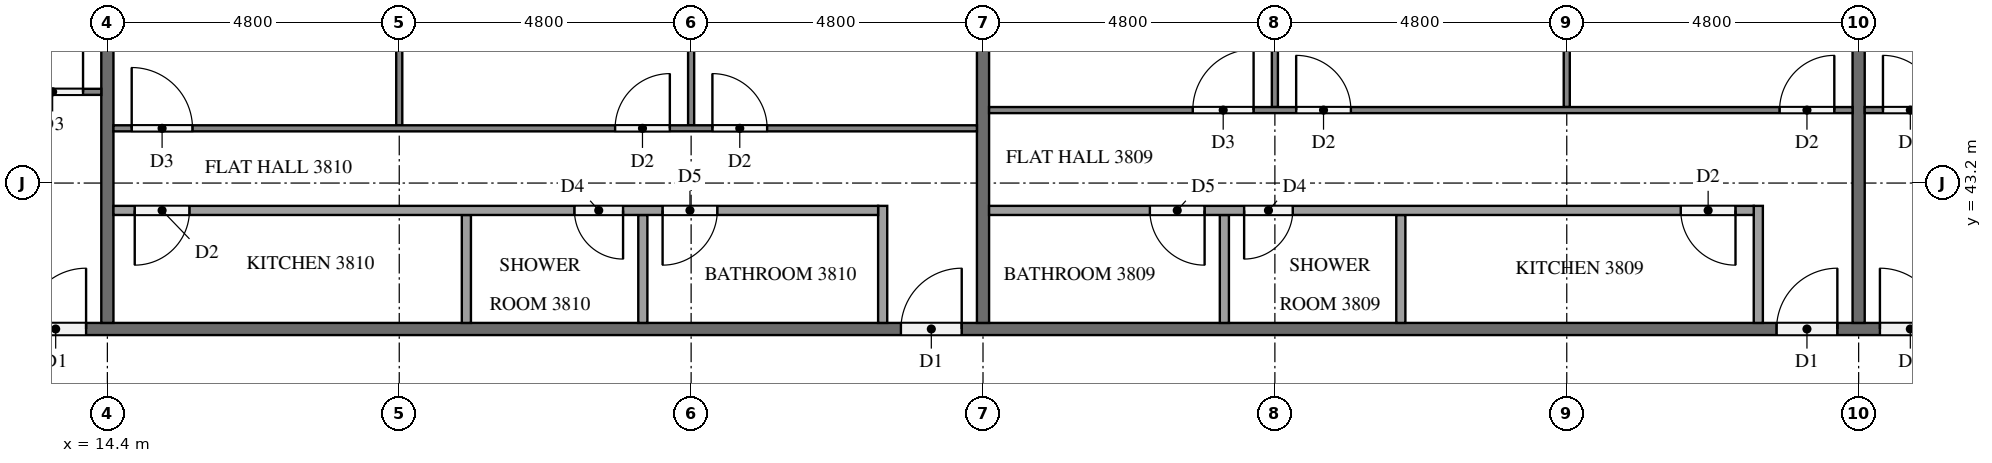
"""IFC4 building model, lengths in metres.
Left out: names, types, materials, properties, quantities, classifications, styles, units other than length and angle.
Written with IfcOpenShell. Run it as: python <this file> out.ifc"""

import sys

from ifc_helpers import new_model, si_unit, direction, frame, frame_2d, origin, place, context, subcontext, project, spatial, rectangle, extrude, element, fill, save


model = new_model("IFC4")
c1 = context("Model", 3, precision=1e-05, world=origin(), true_north=direction((0.0, 1.0)))
c2 = subcontext(c1, "Body", "Model", "MODEL_VIEW")
j1 = project(units=[si_unit("LENGTHUNIT", "METRE"), si_unit("PLANEANGLEUNIT", "RADIAN")], contexts=[c1])
p1 = place(None, origin())
s1 = spatial("IfcSite", under=j1, at=p1, CompositionType="ELEMENT")
p2 = place(p1, origin())
s2 = spatial("IfcBuilding", under=s1, at=p2, CompositionType="ELEMENT")
p3 = place(p2, frame((0.0, 0.0, 149.0)))
s3 = spatial("IfcBuildingStorey", under=s2, at=p3, CompositionType="ELEMENT", Elevation=149.0)
p4 = place(p3, frame((11.9, 40.8, 0.0), z_axis=(0.0, 0.0, 1.0), x_axis=(1.0, 0.0, 0.0)))
e1 = element("IfcWall", 1, at=p4, inside=s3, PredefinedType="PARTITIONING", context=c2, shape_type="SweptSolid", body=[
    extrude(rectangle(XDim=38.6, YDim=0.2, at=frame_2d((19.3, 0.0))), origin(), (0.0, 0.0, 1.0), 3.2),
])
p5 = place(p4, frame((31.65, 0.0, 0.0)))
e2 = element("IfcOpeningElement", 2, at=p5, cuts=e1, PredefinedType="OPENING", context=c2, shape_type="SweptSolid", body=[
    extrude(rectangle(XDim=1.0, YDim=2.1, at=frame_2d((0.5, 1.05))), frame((0.0, 0.11, 0.0), z_axis=(0.0, -1.0, 0.0), x_axis=(1.0, 0.0, 0.0)), (0.0, 0.0, 1.0), 0.22),
])
p6 = place(p4, frame((29.95, 0.0, 0.0)))
e3 = element("IfcOpeningElement", 3, at=p6, cuts=e1, PredefinedType="OPENING", context=c2, shape_type="SweptSolid", body=[
    extrude(rectangle(XDim=1.0, YDim=2.1, at=frame_2d((0.5, 1.05))), frame((0.0, 0.11, 0.0), z_axis=(0.0, -1.0, 0.0), x_axis=(1.0, 0.0, 0.0)), (0.0, 0.0, 1.0), 0.22),
])
p7 = place(p4, frame((15.55, 0.0, 0.0)))
e4 = element("IfcOpeningElement", 4, at=p7, cuts=e1, PredefinedType="OPENING", context=c2, shape_type="SweptSolid", body=[
    extrude(rectangle(XDim=1.0, YDim=2.1, at=frame_2d((0.5, 1.05))), frame((0.0, 0.11, 0.0), z_axis=(0.0, -1.0, 0.0), x_axis=(1.0, 0.0, 0.0)), (0.0, 0.0, 1.0), 0.22),
])
p8 = place(p4, frame((1.15, 0.0, 0.0)))
e5 = element("IfcOpeningElement", 5, at=p8, cuts=e1, PredefinedType="OPENING", context=c2, shape_type="SweptSolid", body=[
    extrude(rectangle(XDim=1.0, YDim=2.1, at=frame_2d((0.5, 1.05))), frame((0.0, 0.11, 0.0), z_axis=(0.0, -1.0, 0.0), x_axis=(1.0, 0.0, 0.0)), (0.0, 0.0, 1.0), 0.22),
])
p9 = place(p3, frame((43.2, 47.625, 0.0), z_axis=(0.0, 0.0, 1.0), x_axis=(0.0, -1.0, 0.0)))
e6 = element("IfcWall", 6, at=p9, inside=s3, PredefinedType="PARTITIONING", context=c2, shape_type="SweptSolid", body=[
    extrude(rectangle(XDim=6.725, YDim=0.2, at=frame_2d((3.363, 0.0))), origin(), (0.0, 0.0, 1.0), 3.2),
])
p10 = place(p3, frame((28.8, 47.9, 0.0), z_axis=(0.0, 0.0, 1.0), x_axis=(0.0, -1.0, 0.0)))
e7 = element("IfcWall", 7, at=p10, inside=s3, PredefinedType="PARTITIONING", context=c2, shape_type="SweptSolid", body=[
    extrude(rectangle(XDim=7.0, YDim=0.2, at=frame_2d((3.5, 0.0))), origin(), (0.0, 0.0, 1.0), 3.2),
])
p11 = place(p3, frame((14.4, 47.625, 0.0), z_axis=(0.0, 0.0, 1.0), x_axis=(0.0, -1.0, 0.0)))
e8 = element("IfcWall", 8, at=p11, inside=s3, PredefinedType="PARTITIONING", context=c2, shape_type="SweptSolid", body=[
    extrude(rectangle(XDim=6.725, YDim=0.2, at=frame_2d((3.363, 0.0))), origin(), (0.0, 0.0, 1.0), 3.2),
])
p12 = place(p3, frame((43.3, 44.4, 0.0), z_axis=(0.0, 0.0, 1.0), x_axis=(1.0, 0.0, 0.0)))
e9 = element("IfcWall", 9, at=p12, inside=s3, PredefinedType="PARTITIONING", context=c2, shape_type="SweptSolid", body=[
    extrude(rectangle(XDim=13.878, YDim=0.1, at=frame_2d((6.939, 0.0))), origin(), (0.0, 0.0, 1.0), 3.2),
])
p13 = place(p12, frame((0.3, 0.0, 0.0)))
e10 = element("IfcOpeningElement", 10, at=p13, cuts=e9, PredefinedType="OPENING", context=c2, shape_type="SweptSolid", body=[
    extrude(rectangle(XDim=0.9, YDim=2.1, at=frame_2d((0.45, 1.05))), frame((0.0, 0.06, 0.0), z_axis=(0.0, -1.0, 0.0), x_axis=(1.0, 0.0, 0.0)), (0.0, 0.0, 1.0), 0.12),
])
p14 = place(p12, frame((8.15, 0.0, 0.0)))
e11 = element("IfcOpeningElement", 11, at=p14, cuts=e9, PredefinedType="OPENING", context=c2, shape_type="SweptSolid", body=[
    extrude(rectangle(XDim=1.0, YDim=2.1, at=frame_2d((0.5, 1.05))), frame((0.0, 0.06, 0.0), z_axis=(0.0, -1.0, 0.0), x_axis=(1.0, 0.0, 0.0)), (0.0, 0.0, 1.0), 0.12),
])
p15 = place(p12, frame((9.85, 0.0, 0.0)))
e12 = element("IfcOpeningElement", 12, at=p15, cuts=e9, PredefinedType="OPENING", context=c2, shape_type="SweptSolid", body=[
    extrude(rectangle(XDim=0.9, YDim=2.1, at=frame_2d((0.45, 1.05))), frame((0.0, 0.06, 0.0), z_axis=(0.0, -1.0, 0.0), x_axis=(1.0, 0.0, 0.0)), (0.0, 0.0, 1.0), 0.12),
])
p16 = place(p3, frame((38.4, 44.45, 0.0), z_axis=(0.0, 0.0, 1.0), x_axis=(0.0, 1.0, 0.0)))
e13 = element("IfcWall", 13, at=p16, inside=s3, PredefinedType="PARTITIONING", context=c2, shape_type="SweptSolid", body=[
    extrude(rectangle(XDim=3.45, YDim=0.1, at=frame_2d((1.725, 0.0))), origin(), (0.0, 0.0, 1.0), 3.2),
])
p17 = place(p3, frame((33.6, 44.45, 0.0), z_axis=(0.0, 0.0, 1.0), x_axis=(0.0, 1.0, 0.0)))
e14 = element("IfcWall", 14, at=p17, inside=s3, PredefinedType="PARTITIONING", context=c2, shape_type="SweptSolid", body=[
    extrude(rectangle(XDim=3.175, YDim=0.1, at=frame_2d((1.587, 0.0))), origin(), (0.0, 0.0, 1.0), 3.2),
])
p18 = place(p3, frame((28.9, 44.4, 0.0), z_axis=(0.0, 0.0, 1.0), x_axis=(1.0, 0.0, 0.0)))
e15 = element("IfcWall", 15, at=p18, inside=s3, PredefinedType="PARTITIONING", context=c2, shape_type="SweptSolid", body=[
    extrude(rectangle(XDim=14.2, YDim=0.1, at=frame_2d((7.1, 0.0))), origin(), (0.0, 0.0, 1.0), 3.2),
])
p19 = place(p18, frame((13.0, 0.0, 0.0)))
e16 = element("IfcOpeningElement", 16, at=p19, cuts=e15, PredefinedType="OPENING", context=c2, shape_type="SweptSolid", body=[
    extrude(rectangle(XDim=0.9, YDim=2.1, at=frame_2d((0.45, 1.05))), frame((0.0, 0.06, 0.0), z_axis=(0.0, -1.0, 0.0), x_axis=(1.0, 0.0, 0.0)), (0.0, 0.0, 1.0), 0.12),
])
p20 = place(p18, frame((5.05, 0.0, 0.0)))
e17 = element("IfcOpeningElement", 17, at=p20, cuts=e15, PredefinedType="OPENING", context=c2, shape_type="SweptSolid", body=[
    extrude(rectangle(XDim=0.9, YDim=2.1, at=frame_2d((0.45, 1.05))), frame((0.0, 0.06, 0.0), z_axis=(0.0, -1.0, 0.0), x_axis=(1.0, 0.0, 0.0)), (0.0, 0.0, 1.0), 0.12),
])
p21 = place(p18, frame((3.35, 0.0, 0.0)))
e18 = element("IfcOpeningElement", 18, at=p21, cuts=e15, PredefinedType="OPENING", context=c2, shape_type="SweptSolid", body=[
    extrude(rectangle(XDim=1.0, YDim=2.1, at=frame_2d((0.5, 1.05))), frame((0.0, 0.06, 0.0), z_axis=(0.0, -1.0, 0.0), x_axis=(1.0, 0.0, 0.0)), (0.0, 0.0, 1.0), 0.12),
])
for number, where, z_axis, x_axis in (
    (19, (35.671, 40.9, 0.0), (0.0, 0.0, 1.0), (0.0, 1.0, 0.0)),
    (20, (32.769, 40.9, 0.0), (0.0, 0.0, 1.0), (0.0, 1.0, 0.0)),
):
    element("IfcWall", number, at=place(p3, frame(where, z_axis=z_axis, x_axis=x_axis)), inside=s3, PredefinedType="PARTITIONING", context=c2, shape_type="SweptSolid", body=[
        extrude(rectangle(XDim=1.775, YDim=0.15, at=frame_2d((0.888, 0.0))), origin(), (0.0, 0.0, 1.0), 3.2),
    ])
p22 = place(p3, frame((41.55, 40.9, 0.0), z_axis=(0.0, 0.0, 1.0), x_axis=(0.0, 1.0, 0.0)))
e21 = element("IfcWall", 21, at=p22, inside=s3, PredefinedType="PARTITIONING", context=c2, shape_type="SweptSolid", body=[
    extrude(rectangle(XDim=1.925, YDim=0.15, at=frame_2d((0.962, 0.0))), origin(), (0.0, 0.0, 1.0), 3.2),
])
p23 = place(p3, frame((41.475, 42.75, 0.0), z_axis=(0.0, 0.0, 1.0), x_axis=(-1.0, 0.0, 0.0)))
e22 = element("IfcWall", 22, at=p23, inside=s3, PredefinedType="PARTITIONING", context=c2, shape_type="SweptSolid", body=[
    extrude(rectangle(XDim=12.575, YDim=0.15, at=frame_2d((6.288, 0.0))), origin(), (0.0, 0.0, 1.0), 3.2),
])
p24 = place(p23, frame((0.3, 0.0, 0.0)))
e23 = element("IfcOpeningElement", 23, at=p24, cuts=e22, PredefinedType="OPENING", context=c2, shape_type="SweptSolid", body=[
    extrude(rectangle(XDim=0.9, YDim=2.1, at=frame_2d((0.45, 1.05))), frame((0.0, 0.085, 0.0), z_axis=(0.0, -1.0, 0.0), x_axis=(1.0, 0.0, 0.0)), (0.0, 0.0, 1.0), 0.17),
])
p25 = place(p23, frame((7.581, 0.0, 0.0)))
e24 = element("IfcOpeningElement", 24, at=p25, cuts=e22, PredefinedType="OPENING", context=c2, shape_type="SweptSolid", body=[
    extrude(rectangle(XDim=0.8, YDim=2.1, at=frame_2d((0.4, 1.05))), frame((0.0, 0.085, 0.0), z_axis=(0.0, -1.0, 0.0), x_axis=(1.0, 0.0, 0.0)), (0.0, 0.0, 1.0), 0.17),
])
p26 = place(p23, frame((9.031, 0.0, 0.0)))
e25 = element("IfcOpeningElement", 25, at=p26, cuts=e22, PredefinedType="OPENING", context=c2, shape_type="SweptSolid", body=[
    extrude(rectangle(XDim=0.9, YDim=2.1, at=frame_2d((0.45, 1.05))), frame((0.0, 0.085, 0.0), z_axis=(0.0, -1.0, 0.0), x_axis=(1.0, 0.0, 0.0)), (0.0, 0.0, 1.0), 0.17),
])
p27 = place(p3, frame((24.0, 44.15, 0.0), z_axis=(0.0, 0.0, 1.0), x_axis=(0.0, 1.0, 0.0)))
e26 = element("IfcWall", 26, at=p27, inside=s3, PredefinedType="PARTITIONING", context=c2, shape_type="SweptSolid", body=[
    extrude(rectangle(XDim=3.475, YDim=0.1, at=frame_2d((1.738, 0.0))), origin(), (0.0, 0.0, 1.0), 3.2),
])
p28 = place(p3, frame((19.2, 44.15, 0.0), z_axis=(0.0, 0.0, 1.0), x_axis=(0.0, 1.0, 0.0)))
e27 = element("IfcWall", 27, at=p28, inside=s3, PredefinedType="PARTITIONING", context=c2, shape_type="SweptSolid", body=[
    extrude(rectangle(XDim=3.75, YDim=0.1, at=frame_2d((1.875, 0.0))), origin(), (0.0, 0.0, 1.0), 3.2),
])
p29 = place(p3, frame((14.5, 44.1, 0.0), z_axis=(0.0, 0.0, 1.0), x_axis=(1.0, 0.0, 0.0)))
e28 = element("IfcWall", 28, at=p29, inside=s3, PredefinedType="PARTITIONING", context=c2, shape_type="SweptSolid", body=[
    extrude(rectangle(XDim=14.2, YDim=0.1, at=frame_2d((7.1, 0.0))), origin(), (0.0, 0.0, 1.0), 3.2),
])
p30 = place(p29, frame((9.85, 0.0, 0.0)))
e29 = element("IfcOpeningElement", 29, at=p30, cuts=e28, PredefinedType="OPENING", context=c2, shape_type="SweptSolid", body=[
    extrude(rectangle(XDim=0.9, YDim=2.1, at=frame_2d((0.45, 1.05))), frame((0.0, 0.06, 0.0), z_axis=(0.0, -1.0, 0.0), x_axis=(1.0, 0.0, 0.0)), (0.0, 0.0, 1.0), 0.12),
])
p31 = place(p29, frame((8.25, 0.0, 0.0)))
e30 = element("IfcOpeningElement", 30, at=p31, cuts=e28, PredefinedType="OPENING", context=c2, shape_type="SweptSolid", body=[
    extrude(rectangle(XDim=0.9, YDim=2.1, at=frame_2d((0.45, 1.05))), frame((0.0, 0.06, 0.0), z_axis=(0.0, -1.0, 0.0), x_axis=(1.0, 0.0, 0.0)), (0.0, 0.0, 1.0), 0.12),
])
p32 = place(p29, frame((0.3, 0.0, 0.0)))
e31 = element("IfcOpeningElement", 31, at=p32, cuts=e28, PredefinedType="OPENING", context=c2, shape_type="SweptSolid", body=[
    extrude(rectangle(XDim=1.0, YDim=2.1, at=frame_2d((0.5, 1.05))), frame((0.0, 0.06, 0.0), z_axis=(0.0, -1.0, 0.0), x_axis=(1.0, 0.0, 0.0)), (0.0, 0.0, 1.0), 0.12),
])
for number, where, z_axis, x_axis in (
    (32, (23.206, 40.9, 0.0), (0.0, 0.0, 1.0), (0.0, 1.0, 0.0)),
    (33, (20.304, 40.9, 0.0), (0.0, 0.0, 1.0), (0.0, 1.0, 0.0)),
):
    element("IfcWall", number, at=place(p3, frame(where, z_axis=z_axis, x_axis=x_axis)), inside=s3, PredefinedType="PARTITIONING", context=c2, shape_type="SweptSolid", body=[
        extrude(rectangle(XDim=1.775, YDim=0.15, at=frame_2d((0.888, 0.0))), origin(), (0.0, 0.0, 1.0), 3.2),
    ])
p33 = place(p3, frame((27.15, 40.9, 0.0), z_axis=(0.0, 0.0, 1.0), x_axis=(0.0, 1.0, 0.0)))
e34 = element("IfcWall", 34, at=p33, inside=s3, PredefinedType="PARTITIONING", context=c2, shape_type="SweptSolid", body=[
    extrude(rectangle(XDim=1.925, YDim=0.15, at=frame_2d((0.962, 0.0))), origin(), (0.0, 0.0, 1.0), 3.2),
])
p34 = place(p3, frame((27.075, 42.75, 0.0), z_axis=(0.0, 0.0, 1.0), x_axis=(-1.0, 0.0, 0.0)))
e35 = element("IfcWall", 35, at=p34, inside=s3, PredefinedType="PARTITIONING", context=c2, shape_type="SweptSolid", body=[
    extrude(rectangle(XDim=12.575, YDim=0.15, at=frame_2d((6.288, 0.0))), origin(), (0.0, 0.0, 1.0), 3.2),
])
p35 = place(p34, frame((2.644, 0.0, 0.0)))
e36 = element("IfcOpeningElement", 36, at=p35, cuts=e35, PredefinedType="OPENING", context=c2, shape_type="SweptSolid", body=[
    extrude(rectangle(XDim=0.9, YDim=2.1, at=frame_2d((0.45, 1.05))), frame((0.0, 0.085, 0.0), z_axis=(0.0, -1.0, 0.0), x_axis=(1.0, 0.0, 0.0)), (0.0, 0.0, 1.0), 0.17),
])
p36 = place(p34, frame((4.194, 0.0, 0.0)))
e37 = element("IfcOpeningElement", 37, at=p36, cuts=e35, PredefinedType="OPENING", context=c2, shape_type="SweptSolid", body=[
    extrude(rectangle(XDim=0.8, YDim=2.1, at=frame_2d((0.4, 1.05))), frame((0.0, 0.085, 0.0), z_axis=(0.0, -1.0, 0.0), x_axis=(1.0, 0.0, 0.0)), (0.0, 0.0, 1.0), 0.17),
])
p37 = place(p34, frame((11.325, 0.0, 0.0)))
e38 = element("IfcOpeningElement", 38, at=p37, cuts=e35, PredefinedType="OPENING", context=c2, shape_type="SweptSolid", body=[
    extrude(rectangle(XDim=0.9, YDim=2.1, at=frame_2d((0.45, 1.05))), frame((0.0, 0.085, 0.0), z_axis=(0.0, -1.0, 0.0), x_axis=(1.0, 0.0, 0.0)), (0.0, 0.0, 1.0), 0.17),
])
p38 = place(p3, frame((0.502, 44.7, 0.0), z_axis=(0.0, 0.0, 1.0), x_axis=(1.0, 0.0, 0.0)))
e39 = element("IfcWall", 39, at=p38, inside=s3, PredefinedType="PARTITIONING", context=c2, shape_type="SweptSolid", body=[
    extrude(rectangle(XDim=13.798, YDim=0.1, at=frame_2d((6.899, 0.0))), origin(), (0.0, 0.0, 1.0), 3.2),
])
p39 = place(p38, frame((12.498, 0.0, 0.0)))
e40 = element("IfcOpeningElement", 40, at=p39, cuts=e39, PredefinedType="OPENING", context=c2, shape_type="SweptSolid", body=[
    extrude(rectangle(XDim=1.0, YDim=2.1, at=frame_2d((0.5, 1.05))), frame((0.0, 0.06, 0.0), z_axis=(0.0, -1.0, 0.0), x_axis=(1.0, 0.0, 0.0)), (0.0, 0.0, 1.0), 0.12),
])
p40 = place(p38, frame((4.648, 0.0, 0.0)))
e41 = element("IfcOpeningElement", 41, at=p40, cuts=e39, PredefinedType="OPENING", context=c2, shape_type="SweptSolid", body=[
    extrude(rectangle(XDim=0.9, YDim=2.1, at=frame_2d((0.45, 1.05))), frame((0.0, 0.06, 0.0), z_axis=(0.0, -1.0, 0.0), x_axis=(1.0, 0.0, 0.0)), (0.0, 0.0, 1.0), 0.12),
])
p41 = place(p38, frame((3.048, 0.0, 0.0)))
e42 = element("IfcOpeningElement", 42, at=p41, cuts=e39, PredefinedType="OPENING", context=c2, shape_type="SweptSolid", body=[
    extrude(rectangle(XDim=0.9, YDim=2.1, at=frame_2d((0.45, 1.05))), frame((0.0, 0.06, 0.0), z_axis=(0.0, -1.0, 0.0), x_axis=(1.0, 0.0, 0.0)), (0.0, 0.0, 1.0), 0.12),
])
p42 = place(p5, origin())
e43 = element("IfcDoor", 43, at=p42, inside=s3, OperationType="SINGLE_SWING_LEFT", PredefinedType="DOOR", context=c2, shape_type="SweptSolid", body=[
    extrude(rectangle(XDim=1.0, YDim=2.1, at=frame_2d((0.5, 1.05))), frame((0.0, 0.025, 0.0), z_axis=(0.0, -1.0, 0.0), x_axis=(1.0, 0.0, 0.0)), (0.0, 0.0, 1.0), 0.05),
])
fill(e2, e43)
p43 = place(p6, origin())
e44 = element("IfcDoor", 44, at=p43, inside=s3, OperationType="SINGLE_SWING_RIGHT", PredefinedType="DOOR", context=c2, shape_type="SweptSolid", body=[
    extrude(rectangle(XDim=1.0, YDim=2.1, at=frame_2d((0.5, 1.05))), frame((0.0, 0.025, 0.0), z_axis=(0.0, -1.0, 0.0), x_axis=(1.0, 0.0, 0.0)), (0.0, 0.0, 1.0), 0.05),
])
fill(e3, e44)
p44 = place(p7, origin())
e45 = element("IfcDoor", 45, at=p44, inside=s3, OperationType="SINGLE_SWING_RIGHT", PredefinedType="DOOR", context=c2, shape_type="SweptSolid", body=[
    extrude(rectangle(XDim=1.0, YDim=2.1, at=frame_2d((0.5, 1.05))), frame((0.0, 0.025, 0.0), z_axis=(0.0, -1.0, 0.0), x_axis=(1.0, 0.0, 0.0)), (0.0, 0.0, 1.0), 0.05),
])
fill(e4, e45)
p45 = place(p8, origin())
e46 = element("IfcDoor", 46, at=p45, inside=s3, OperationType="SINGLE_SWING_RIGHT", PredefinedType="DOOR", context=c2, shape_type="SweptSolid", body=[
    extrude(rectangle(XDim=1.0, YDim=2.1, at=frame_2d((0.5, 1.05))), frame((0.0, 0.025, 0.0), z_axis=(0.0, -1.0, 0.0), x_axis=(1.0, 0.0, 0.0)), (0.0, 0.0, 1.0), 0.05),
])
fill(e5, e46)
p46 = place(p13, origin())
e47 = element("IfcDoor", 47, at=p46, inside=s3, OperationType="SINGLE_SWING_LEFT", PredefinedType="DOOR", context=c2, shape_type="SweptSolid", body=[
    extrude(rectangle(XDim=0.9, YDim=2.1, at=frame_2d((0.45, 1.05))), frame((0.0, 0.025, 0.0), z_axis=(0.0, -1.0, 0.0), x_axis=(1.0, 0.0, 0.0)), (0.0, 0.0, 1.0), 0.05),
])
fill(e10, e47)
p47 = place(p19, origin())
e48 = element("IfcDoor", 48, at=p47, inside=s3, OperationType="SINGLE_SWING_RIGHT", PredefinedType="DOOR", context=c2, shape_type="SweptSolid", body=[
    extrude(rectangle(XDim=0.9, YDim=2.1, at=frame_2d((0.45, 1.05))), frame((0.0, 0.025, 0.0), z_axis=(0.0, -1.0, 0.0), x_axis=(1.0, 0.0, 0.0)), (0.0, 0.0, 1.0), 0.05),
])
fill(e16, e48)
p48 = place(p20, origin())
e49 = element("IfcDoor", 49, at=p48, inside=s3, OperationType="SINGLE_SWING_LEFT", PredefinedType="DOOR", context=c2, shape_type="SweptSolid", body=[
    extrude(rectangle(XDim=0.9, YDim=2.1, at=frame_2d((0.45, 1.05))), frame((0.0, 0.025, 0.0), z_axis=(0.0, -1.0, 0.0), x_axis=(1.0, 0.0, 0.0)), (0.0, 0.0, 1.0), 0.05),
])
fill(e17, e49)
p49 = place(p21, origin())
e50 = element("IfcDoor", 50, at=p49, inside=s3, OperationType="SINGLE_SWING_RIGHT", PredefinedType="DOOR", context=c2, shape_type="SweptSolid", body=[
    extrude(rectangle(XDim=1.0, YDim=2.1, at=frame_2d((0.5, 1.05))), frame((0.0, 0.025, 0.0), z_axis=(0.0, -1.0, 0.0), x_axis=(1.0, 0.0, 0.0)), (0.0, 0.0, 1.0), 0.05),
])
fill(e18, e50)
p50 = place(p24, origin())
e51 = element("IfcDoor", 51, at=p50, inside=s3, OperationType="SINGLE_SWING_LEFT", PredefinedType="DOOR", context=c2, shape_type="SweptSolid", body=[
    extrude(rectangle(XDim=0.9, YDim=2.1, at=frame_2d((0.45, 1.05))), frame((0.0, 0.025, 0.0), z_axis=(0.0, -1.0, 0.0), x_axis=(1.0, 0.0, 0.0)), (0.0, 0.0, 1.0), 0.05),
])
fill(e23, e51)
p51 = place(p25, origin())
e52 = element("IfcDoor", 52, at=p51, inside=s3, OperationType="SINGLE_SWING_RIGHT", PredefinedType="DOOR", context=c2, shape_type="SweptSolid", body=[
    extrude(rectangle(XDim=0.8, YDim=2.1, at=frame_2d((0.4, 1.05))), frame((0.0, 0.025, 0.0), z_axis=(0.0, -1.0, 0.0), x_axis=(1.0, 0.0, 0.0)), (0.0, 0.0, 1.0), 0.05),
])
fill(e24, e52)
p52 = place(p26, origin())
e53 = element("IfcDoor", 53, at=p52, inside=s3, OperationType="SINGLE_SWING_LEFT", PredefinedType="DOOR", context=c2, shape_type="SweptSolid", body=[
    extrude(rectangle(XDim=0.9, YDim=2.1, at=frame_2d((0.45, 1.05))), frame((0.0, 0.025, 0.0), z_axis=(0.0, -1.0, 0.0), x_axis=(1.0, 0.0, 0.0)), (0.0, 0.0, 1.0), 0.05),
])
fill(e25, e53)
p53 = place(p30, origin())
e54 = element("IfcDoor", 54, at=p53, inside=s3, OperationType="SINGLE_SWING_LEFT", PredefinedType="DOOR", context=c2, shape_type="SweptSolid", body=[
    extrude(rectangle(XDim=0.9, YDim=2.1, at=frame_2d((0.45, 1.05))), frame((0.0, 0.025, 0.0), z_axis=(0.0, -1.0, 0.0), x_axis=(1.0, 0.0, 0.0)), (0.0, 0.0, 1.0), 0.05),
])
fill(e29, e54)
p54 = place(p31, origin())
e55 = element("IfcDoor", 55, at=p54, inside=s3, OperationType="SINGLE_SWING_RIGHT", PredefinedType="DOOR", context=c2, shape_type="SweptSolid", body=[
    extrude(rectangle(XDim=0.9, YDim=2.1, at=frame_2d((0.45, 1.05))), frame((0.0, 0.025, 0.0), z_axis=(0.0, -1.0, 0.0), x_axis=(1.0, 0.0, 0.0)), (0.0, 0.0, 1.0), 0.05),
])
fill(e30, e55)
p55 = place(p32, origin())
e56 = element("IfcDoor", 56, at=p55, inside=s3, OperationType="SINGLE_SWING_LEFT", PredefinedType="DOOR", context=c2, shape_type="SweptSolid", body=[
    extrude(rectangle(XDim=1.0, YDim=2.1, at=frame_2d((0.5, 1.05))), frame((0.0, 0.025, 0.0), z_axis=(0.0, -1.0, 0.0), x_axis=(1.0, 0.0, 0.0)), (0.0, 0.0, 1.0), 0.05),
])
fill(e31, e56)
p56 = place(p35, origin())
e57 = element("IfcDoor", 57, at=p56, inside=s3, OperationType="SINGLE_SWING_RIGHT", PredefinedType="DOOR", context=c2, shape_type="SweptSolid", body=[
    extrude(rectangle(XDim=0.9, YDim=2.1, at=frame_2d((0.45, 1.05))), frame((0.0, 0.025, 0.0), z_axis=(0.0, -1.0, 0.0), x_axis=(1.0, 0.0, 0.0)), (0.0, 0.0, 1.0), 0.05),
])
fill(e36, e57)
p57 = place(p36, origin())
e58 = element("IfcDoor", 58, at=p57, inside=s3, OperationType="SINGLE_SWING_LEFT", PredefinedType="DOOR", context=c2, shape_type="SweptSolid", body=[
    extrude(rectangle(XDim=0.8, YDim=2.1, at=frame_2d((0.4, 1.05))), frame((0.0, 0.025, 0.0), z_axis=(0.0, -1.0, 0.0), x_axis=(1.0, 0.0, 0.0)), (0.0, 0.0, 1.0), 0.05),
])
fill(e37, e58)
p58 = place(p37, origin())
e59 = element("IfcDoor", 59, at=p58, inside=s3, OperationType="SINGLE_SWING_RIGHT", PredefinedType="DOOR", context=c2, shape_type="SweptSolid", body=[
    extrude(rectangle(XDim=0.9, YDim=2.1, at=frame_2d((0.45, 1.05))), frame((0.0, 0.025, 0.0), z_axis=(0.0, -1.0, 0.0), x_axis=(1.0, 0.0, 0.0)), (0.0, 0.0, 1.0), 0.05),
])
fill(e38, e59)
p59 = place(p39, origin())
e60 = element("IfcDoor", 60, at=p59, inside=s3, OperationType="SINGLE_SWING_RIGHT", PredefinedType="DOOR", context=c2, shape_type="SweptSolid", body=[
    extrude(rectangle(XDim=1.0, YDim=2.1, at=frame_2d((0.5, 1.05))), frame((0.0, 0.025, 0.0), z_axis=(0.0, -1.0, 0.0), x_axis=(1.0, 0.0, 0.0)), (0.0, 0.0, 1.0), 0.05),
])
fill(e40, e60)
save(model, sys.argv[1])
